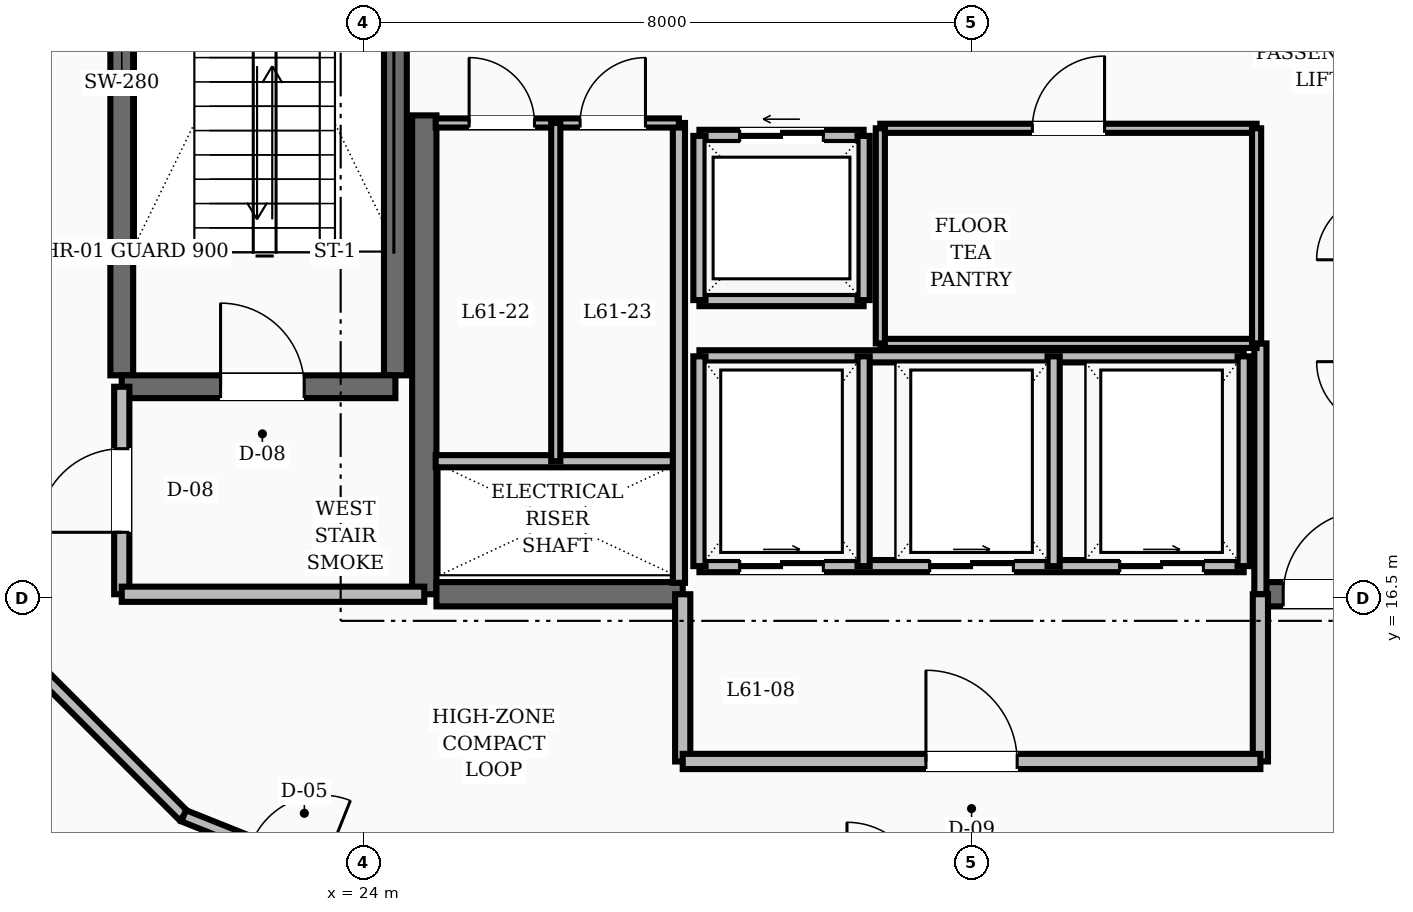
"""IFC4 building model, lengths in metres.
Left out: names, types, materials, properties, quantities, classifications, styles, units other than length and angle.
Written with IfcOpenShell. Run it as: python <this file> out.ifc"""

import sys

from ifc_helpers import new_model, si_unit, direction, frame, frame_2d, origin, place, context, subcontext, project, spatial, rectangle, extrude, element, fill, save


model = new_model("IFC4")
c1 = context("Model", 3, precision=1e-05, world=origin(), true_north=direction((0.0, 1.0)))
c2 = subcontext(c1, "Body", "Model", "MODEL_VIEW")
j1 = project(units=[si_unit("LENGTHUNIT", "METRE"), si_unit("PLANEANGLEUNIT", "RADIAN")], contexts=[c1])
p1 = place(None, origin())
s1 = spatial("IfcSite", under=j1, at=p1, CompositionType="ELEMENT")
p2 = place(p1, origin())
s2 = spatial("IfcBuilding", under=s1, at=p2, CompositionType="ELEMENT")
p3 = place(p2, frame((0.0, 0.0, 236.4)))
s3 = spatial("IfcBuildingStorey", under=s2, at=p3, CompositionType="ELEMENT", Elevation=236.4)
p4 = place(p3, frame((24.8, 16.55, 0.0), z_axis=(0.0, 0.0, 1.0), x_axis=(0.0, 1.0, 0.0)))
e1 = element("IfcWall", 1, at=p4, inside=s3, PredefinedType="SHEAR", context=c2, shape_type="SweptSolid", body=[
    extrude(rectangle(XDim=6.3, YDim=0.32, at=frame_2d((3.15, 0.0))), origin(), (0.0, 0.0, 1.0), 3.6),
])
p5 = place(p3, frame((24.96, 16.55, 0.0), z_axis=(0.0, 0.0, 1.0), x_axis=(1.0, 0.0, 0.0)))
e2 = element("IfcWall", 2, at=p5, inside=s3, PredefinedType="SHEAR", context=c2, shape_type="SweptSolid", body=[
    extrude(rectangle(XDim=3.24, YDim=0.32, at=frame_2d((1.62, 0.0))), origin(), (0.0, 0.0, 1.0), 3.6),
])
p6 = place(p3, frame((35.8, 16.55, 0.0), z_axis=(0.0, 0.0, 1.0), x_axis=(1.0, 0.0, 0.0)))
e3 = element("IfcWall", 3, at=p6, inside=s3, PredefinedType="SHEAR", context=c2, shape_type="SweptSolid", body=[
    extrude(rectangle(XDim=3.24, YDim=0.32, at=frame_2d((1.62, 0.0))), origin(), (0.0, 0.0, 1.0), 3.6),
])
p7 = place(p6, frame((0.3, 0.0, 0.0)))
e4 = element("IfcOpeningElement", 4, at=p7, cuts=e3, PredefinedType="OPENING", context=c2, shape_type="SweptSolid", body=[
    extrude(rectangle(XDim=1.1, YDim=2.1, at=frame_2d((0.55, 1.05))), frame((0.0, 0.17, 0.0), z_axis=(0.0, -1.0, 0.0), x_axis=(1.0, 0.0, 0.0)), (0.0, 0.0, 1.0), 0.34),
])
for number, where, z_axis, x_axis in (
    (5, (20.82, 19.43, 0.0), (0.0, 0.0, 1.0), (0.0, 1.0, 0.0)),
    (6, (24.42, 19.43, 0.0), (0.0, 0.0, 1.0), (0.0, 1.0, 0.0)),
):
    element("IfcWall", number, at=place(p3, frame(where, z_axis=z_axis, x_axis=x_axis)), inside=s3, PredefinedType="SHEAR", context=c2, shape_type="SweptSolid", body=[
        extrude(rectangle(XDim=8.74, YDim=0.3, at=frame_2d((4.37, 0.0))), origin(), (0.0, 0.0, 1.0), 3.6),
    ])
p8 = place(p3, frame((20.82, 19.28, 0.0), z_axis=(0.0, 0.0, 1.0), x_axis=(1.0, 0.0, 0.0)))
e7 = element("IfcWall", 7, at=p8, inside=s3, PredefinedType="SHEAR", context=c2, shape_type="SweptSolid", body=[
    extrude(rectangle(XDim=3.6, YDim=0.3, at=frame_2d((1.8, 0.0))), origin(), (0.0, 0.0, 1.0), 3.6),
])
p9 = place(p8, frame((1.3, 0.0, 0.0)))
e8 = element("IfcOpeningElement", 8, at=p9, cuts=e7, PredefinedType="OPENING", context=c2, shape_type="SweptSolid", body=[
    extrude(rectangle(XDim=1.1, YDim=2.1, at=frame_2d((0.55, 1.05))), frame((0.0, 0.16, 0.0), z_axis=(0.0, -1.0, 0.0), x_axis=(1.0, 0.0, 0.0)), (0.0, 0.0, 1.0), 0.32),
])
p10 = place(p3, frame((20.82, 16.55, 0.0), z_axis=(0.0, 0.0, 1.0), x_axis=(0.0, 1.0, 0.0)))
e9 = element("IfcWall", 9, at=p10, inside=s3, PredefinedType="SOLIDWALL", context=c2, shape_type="SweptSolid", body=[
    extrude(rectangle(XDim=2.73, YDim=0.2, at=frame_2d((1.365, 0.0))), origin(), (0.0, 0.0, 1.0), 2.87),
])
p11 = place(p10, frame((0.815, 0.0, 0.0)))
e10 = element("IfcOpeningElement", 10, at=p11, cuts=e9, PredefinedType="OPENING", context=c2, shape_type="SweptSolid", body=[
    extrude(rectangle(XDim=1.1, YDim=2.1, at=frame_2d((0.55, 1.05))), frame((0.0, 0.11, 0.0), z_axis=(0.0, -1.0, 0.0), x_axis=(1.0, 0.0, 0.0)), (0.0, 0.0, 1.0), 0.22),
])
p12 = place(p3, frame((20.82, 16.55, 0.0), z_axis=(0.0, 0.0, 1.0), x_axis=(1.0, 0.0, 0.0)))
e11 = element("IfcWall", 11, at=p12, inside=s3, PredefinedType="SOLIDWALL", context=c2, shape_type="SweptSolid", body=[
    extrude(rectangle(XDim=3.98, YDim=0.2, at=frame_2d((1.99, 0.0))), origin(), (0.0, 0.0, 1.0), 2.87),
])
p13 = place(p3, frame((35.8, 16.55, 0.0), z_axis=(0.0, 0.0, 1.0), x_axis=(0.0, 1.0, 0.0)))
e12 = element("IfcWall", 12, at=p13, inside=s3, PredefinedType="SOLIDWALL", context=c2, shape_type="SweptSolid", body=[
    extrude(rectangle(XDim=3.3, YDim=0.16, at=frame_2d((1.65, 0.0))), origin(), (0.0, 0.0, 1.0), 2.87),
])
for number, where, z_axis, x_axis in (
    (13, (28.2, 14.35, 0.0), (0.0, 0.0, 1.0), (0.0, 1.0, 0.0)),
    (14, (35.8, 14.35, 0.0), (0.0, 0.0, 1.0), (0.0, 1.0, 0.0)),
):
    element("IfcWall", number, at=place(p3, frame(where, z_axis=z_axis, x_axis=x_axis)), inside=s3, PredefinedType="SOLIDWALL", context=c2, shape_type="SweptSolid", body=[
        extrude(rectangle(XDim=2.2, YDim=0.2, at=frame_2d((1.1, 0.0))), origin(), (0.0, 0.0, 1.0), 2.87),
    ])
p14 = place(p3, frame((28.2, 14.35, 0.0), z_axis=(0.0, 0.0, 1.0), x_axis=(1.0, 0.0, 0.0)))
e15 = element("IfcWall", 15, at=p14, inside=s3, PredefinedType="SOLIDWALL", context=c2, shape_type="SweptSolid", body=[
    extrude(rectangle(XDim=7.6, YDim=0.2, at=frame_2d((3.8, 0.0))), origin(), (0.0, 0.0, 1.0), 2.87),
])
p15 = place(p14, frame((3.2, 0.0, 0.0)))
e16 = element("IfcOpeningElement", 16, at=p15, cuts=e15, PredefinedType="OPENING", context=c2, shape_type="SweptSolid", body=[
    extrude(rectangle(XDim=1.2, YDim=2.1, at=frame_2d((0.6, 1.05))), frame((0.0, 0.11, 0.0), z_axis=(0.0, -1.0, 0.0), x_axis=(1.0, 0.0, 0.0)), (0.0, 0.0, 1.0), 0.22),
])
p16 = place(p3, frame((28.42, 22.58, 0.0), z_axis=(0.0, 0.0, 1.0), x_axis=(1.0, 0.0, 0.0)))
e17 = element("IfcWall", 17, at=p16, inside=s3, PredefinedType="SOLIDWALL", context=c2, shape_type="SweptSolid", body=[
    extrude(rectangle(XDim=2.16, YDim=0.16, at=frame_2d((1.08, 0.0))), origin(), (0.0, 0.0, 1.0), 2.87),
])
p17 = place(p16, frame((0.53, 0.0, 0.0)))
e18 = element("IfcOpeningElement", 18, at=p17, cuts=e17, PredefinedType="OPENING", context=c2, shape_type="SweptSolid", body=[
    extrude(rectangle(XDim=1.1, YDim=2.15, at=frame_2d((0.55, 1.075))), frame((0.0, 0.09, 0.0), z_axis=(0.0, -1.0, 0.0), x_axis=(1.0, 0.0, 0.0)), (0.0, 0.0, 1.0), 0.18),
])
for number, where, z_axis, x_axis in (
    (19, (28.42, 20.42, 0.0), (0.0, 0.0, 1.0), (1.0, 0.0, 0.0)),
    (20, (28.42, 20.42, 0.0), (0.0, 0.0, 1.0), (0.0, 1.0, 0.0)),
    (21, (30.58, 20.42, 0.0), (0.0, 0.0, 1.0), (0.0, 1.0, 0.0)),
):
    element("IfcWall", number, at=place(p3, frame(where, z_axis=z_axis, x_axis=x_axis)), inside=s3, PredefinedType="SOLIDWALL", context=c2, shape_type="SweptSolid", body=[
        extrude(rectangle(XDim=2.16, YDim=0.16, at=frame_2d((1.08, 0.0))), origin(), (0.0, 0.0, 1.0), 2.87),
    ])
p18 = place(p3, frame((28.42, 16.92, 0.0), z_axis=(0.0, 0.0, 1.0), x_axis=(1.0, 0.0, 0.0)))
e22 = element("IfcWall", 22, at=p18, inside=s3, PredefinedType="SOLIDWALL", context=c2, shape_type="SweptSolid", body=[
    extrude(rectangle(XDim=7.16, YDim=0.16, at=frame_2d((3.58, 0.0))), origin(), (0.0, 0.0, 1.0), 2.87),
])
p19 = place(p18, frame((0.53, 0.0, 0.0)))
e23 = element("IfcOpeningElement", 23, at=p19, cuts=e22, PredefinedType="OPENING", context=c2, shape_type="SweptSolid", body=[
    extrude(rectangle(XDim=1.1, YDim=2.15, at=frame_2d((0.55, 1.075))), frame((0.0, 0.09, 0.0), z_axis=(0.0, -1.0, 0.0), x_axis=(1.0, 0.0, 0.0)), (0.0, 0.0, 1.0), 0.18),
])
p20 = place(p18, frame((3.03, 0.0, 0.0)))
e24 = element("IfcOpeningElement", 24, at=p20, cuts=e22, PredefinedType="OPENING", context=c2, shape_type="SweptSolid", body=[
    extrude(rectangle(XDim=1.1, YDim=2.15, at=frame_2d((0.55, 1.075))), frame((0.0, 0.09, 0.0), z_axis=(0.0, -1.0, 0.0), x_axis=(1.0, 0.0, 0.0)), (0.0, 0.0, 1.0), 0.18),
])
p21 = place(p18, frame((5.53, 0.0, 0.0)))
e25 = element("IfcOpeningElement", 25, at=p21, cuts=e22, PredefinedType="OPENING", context=c2, shape_type="SweptSolid", body=[
    extrude(rectangle(XDim=1.1, YDim=2.15, at=frame_2d((0.55, 1.075))), frame((0.0, 0.09, 0.0), z_axis=(0.0, -1.0, 0.0), x_axis=(1.0, 0.0, 0.0)), (0.0, 0.0, 1.0), 0.18),
])
p22 = place(p3, frame((28.42, 19.68, 0.0), z_axis=(0.0, 0.0, 1.0), x_axis=(1.0, 0.0, 0.0)))
e26 = element("IfcWall", 26, at=p22, inside=s3, PredefinedType="SOLIDWALL", context=c2, shape_type="SweptSolid", body=[
    extrude(rectangle(XDim=7.16, YDim=0.16, at=frame_2d((3.58, 0.0))), origin(), (0.0, 0.0, 1.0), 2.87),
])
for number, where, z_axis, x_axis in (
    (27, (28.42, 16.92, 0.0), (0.0, 0.0, 1.0), (0.0, 1.0, 0.0)),
    (28, (30.58, 16.92, 0.0), (0.0, 0.0, 1.0), (0.0, 1.0, 0.0)),
    (29, (33.08, 16.92, 0.0), (0.0, 0.0, 1.0), (0.0, 1.0, 0.0)),
    (30, (35.58, 16.92, 0.0), (0.0, 0.0, 1.0), (0.0, 1.0, 0.0)),
):
    element("IfcWall", number, at=place(p3, frame(where, z_axis=z_axis, x_axis=x_axis)), inside=s3, PredefinedType="SOLIDWALL", context=c2, shape_type="SweptSolid", body=[
        extrude(rectangle(XDim=2.76, YDim=0.16, at=frame_2d((1.38, 0.0))), origin(), (0.0, 0.0, 1.0), 2.87),
    ])
p23 = place(p3, frame((30.8, 22.68, 0.0), z_axis=(0.0, 0.0, 1.0), x_axis=(1.0, 0.0, 0.0)))
e31 = element("IfcWall", 31, at=p23, inside=s3, PredefinedType="PARTITIONING", context=c2, shape_type="SweptSolid", body=[
    extrude(rectangle(XDim=4.95, YDim=0.12, at=frame_2d((2.475, 0.0))), origin(), (0.0, 0.0, 1.0), 2.87),
])
p24 = place(p23, frame((2.0, 0.0, 0.0)))
e32 = element("IfcOpeningElement", 32, at=p24, cuts=e31, PredefinedType="OPENING", context=c2, shape_type="SweptSolid", body=[
    extrude(rectangle(XDim=0.95, YDim=2.1, at=frame_2d((0.475, 1.05))), frame((0.0, 0.07, 0.0), z_axis=(0.0, -1.0, 0.0), x_axis=(1.0, 0.0, 0.0)), (0.0, 0.0, 1.0), 0.14),
])
p25 = place(p3, frame((30.8, 19.85, 0.0), z_axis=(0.0, 0.0, 1.0), x_axis=(1.0, 0.0, 0.0)))
e33 = element("IfcWall", 33, at=p25, inside=s3, PredefinedType="PARTITIONING", context=c2, shape_type="SweptSolid", body=[
    extrude(rectangle(XDim=4.95, YDim=0.12, at=frame_2d((2.475, 0.0))), origin(), (0.0, 0.0, 1.0), 2.87),
])
for number, where, z_axis, x_axis in (
    (34, (30.8, 19.85, 0.0), (0.0, 0.0, 1.0), (0.0, 1.0, 0.0)),
    (35, (35.75, 19.85, 0.0), (0.0, 0.0, 1.0), (0.0, 1.0, 0.0)),
):
    element("IfcWall", number, at=place(p3, frame(where, z_axis=z_axis, x_axis=x_axis)), inside=s3, PredefinedType="PARTITIONING", context=c2, shape_type="SweptSolid", body=[
        extrude(rectangle(XDim=2.83, YDim=0.12, at=frame_2d((1.415, 0.0))), origin(), (0.0, 0.0, 1.0), 2.87),
    ])
p26 = place(p3, frame((24.95, 18.3, 0.0), z_axis=(0.0, 0.0, 1.0), x_axis=(1.0, 0.0, 0.0)))
e36 = element("IfcWall", 36, at=p26, inside=s3, PredefinedType="SOLIDWALL", context=c2, shape_type="SweptSolid", body=[
    extrude(rectangle(XDim=3.2, YDim=0.16, at=frame_2d((1.6, 0.0))), origin(), (0.0, 0.0, 1.0), 2.87),
])
p27 = place(p3, frame((28.15, 16.7, 0.0), z_axis=(0.0, 0.0, 1.0), x_axis=(0.0, 1.0, 0.0)))
e37 = element("IfcWall", 37, at=p27, inside=s3, PredefinedType="SOLIDWALL", context=c2, shape_type="SweptSolid", body=[
    extrude(rectangle(XDim=6.05, YDim=0.16, at=frame_2d((3.025, 0.0))), origin(), (0.0, 0.0, 1.0), 2.87),
])
p28 = place(p3, frame((24.95, 22.75, 0.0), z_axis=(0.0, 0.0, 1.0), x_axis=(1.0, 0.0, 0.0)))
e38 = element("IfcWall", 38, at=p28, inside=s3, PredefinedType="PARTITIONING", context=c2, shape_type="SweptSolid", body=[
    extrude(rectangle(XDim=3.2, YDim=0.12, at=frame_2d((1.6, 0.0))), origin(), (0.0, 0.0, 1.0), 2.87),
])
p29 = place(p28, frame((0.44, 0.0, 0.0)))
e39 = element("IfcOpeningElement", 39, at=p29, cuts=e38, PredefinedType="OPENING", context=c2, shape_type="SweptSolid", body=[
    extrude(rectangle(XDim=0.86, YDim=2.1, at=frame_2d((0.43, 1.05))), frame((0.0, 0.07, 0.0), z_axis=(0.0, -1.0, 0.0), x_axis=(1.0, 0.0, 0.0)), (0.0, 0.0, 1.0), 0.14),
])
p30 = place(p28, frame((1.9, 0.0, 0.0)))
e40 = element("IfcOpeningElement", 40, at=p30, cuts=e38, PredefinedType="OPENING", context=c2, shape_type="SweptSolid", body=[
    extrude(rectangle(XDim=0.86, YDim=2.1, at=frame_2d((0.43, 1.05))), frame((0.0, 0.07, 0.0), z_axis=(0.0, -1.0, 0.0), x_axis=(1.0, 0.0, 0.0)), (0.0, 0.0, 1.0), 0.14),
])
p31 = place(p3, frame((26.53, 18.3, 0.0), z_axis=(0.0, 0.0, 1.0), x_axis=(0.0, 1.0, 0.0)))
e41 = element("IfcWall", 41, at=p31, inside=s3, PredefinedType="PARTITIONING", context=c2, shape_type="SweptSolid", body=[
    extrude(rectangle(XDim=4.45, YDim=0.12, at=frame_2d((2.225, 0.0))), origin(), (0.0, 0.0, 1.0), 2.87),
])
p32 = place(p3, frame((19.573, 15.697, 0.0), z_axis=(0.0, 0.0, 1.0), x_axis=(0.707106781187, -0.707106781187, 0.0)))
e42 = element("IfcWall", 42, at=p32, inside=s3, PredefinedType="SOLIDWALL", context=c2, shape_type="SweptSolid", body=[
    extrude(rectangle(XDim=2.916, YDim=0.16, at=frame_2d((1.458, 0.0))), origin(), (0.0, 0.0, 1.0), 2.87),
])
p33 = place(p3, frame((21.635, 13.635, 0.0), z_axis=(0.0, 0.0, 1.0), x_axis=(0.92856882165, -0.371160266542, 0.0)))
e43 = element("IfcWall", 43, at=p33, inside=s3, PredefinedType="SOLIDWALL", context=c2, shape_type="SweptSolid", body=[
    extrude(rectangle(XDim=2.923, YDim=0.16, at=frame_2d((1.461, 0.0))), origin(), (0.0, 0.0, 1.0), 2.87),
])
p34 = place(p33, frame((0.962, 0.0, 0.0)))
e44 = element("IfcOpeningElement", 44, at=p34, cuts=e43, PredefinedType="OPENING", context=c2, shape_type="SweptSolid", body=[
    extrude(rectangle(XDim=1.0, YDim=2.1, at=frame_2d((0.5, 1.05))), frame((0.0, 0.09, 0.0), z_axis=(0.0, -1.0, 0.0), x_axis=(1.0, 0.0, 0.0)), (0.0, 0.0, 1.0), 0.18),
])
p35 = place(p9, origin())
e45 = element("IfcDoor", 45, at=p35, inside=s3, OperationType="SINGLE_SWING_LEFT", PredefinedType="DOOR", context=c2, shape_type="SweptSolid", body=[
    extrude(rectangle(XDim=1.1, YDim=2.1, at=frame_2d((0.55, 1.05))), frame((0.0, 0.025, 0.0), z_axis=(0.0, -1.0, 0.0), x_axis=(1.0, 0.0, 0.0)), (0.0, 0.0, 1.0), 0.05),
])
fill(e8, e45)
p36 = place(p11, origin())
e46 = element("IfcDoor", 46, at=p36, inside=s3, OperationType="SINGLE_SWING_LEFT", PredefinedType="DOOR", context=c2, shape_type="SweptSolid", body=[
    extrude(rectangle(XDim=1.1, YDim=2.1, at=frame_2d((0.55, 1.05))), frame((0.0, 0.025, 0.0), z_axis=(0.0, -1.0, 0.0), x_axis=(1.0, 0.0, 0.0)), (0.0, 0.0, 1.0), 0.05),
])
fill(e10, e46)
p37 = place(p7, origin())
e47 = element("IfcDoor", 47, at=p37, inside=s3, OperationType="SINGLE_SWING_RIGHT", PredefinedType="DOOR", context=c2, shape_type="SweptSolid", body=[
    extrude(rectangle(XDim=1.1, YDim=2.1, at=frame_2d((0.55, 1.05))), frame((0.0, 0.025, 0.0), z_axis=(0.0, -1.0, 0.0), x_axis=(1.0, 0.0, 0.0)), (0.0, 0.0, 1.0), 0.05),
])
fill(e4, e47)
p38 = place(p15, origin())
e48 = element("IfcDoor", 48, at=p38, inside=s3, OperationType="SINGLE_SWING_LEFT", PredefinedType="DOOR", context=c2, shape_type="SweptSolid", body=[
    extrude(rectangle(XDim=1.2, YDim=2.1, at=frame_2d((0.6, 1.05))), frame((0.0, 0.025, 0.0), z_axis=(0.0, -1.0, 0.0), x_axis=(1.0, 0.0, 0.0)), (0.0, 0.0, 1.0), 0.05),
])
fill(e16, e48)
p39 = place(p17, origin())
e49 = element("IfcDoor", 49, at=p39, inside=s3, OperationType="SLIDING_TO_LEFT", PredefinedType="DOOR", context=c2, shape_type="SweptSolid", body=[
    extrude(rectangle(XDim=1.1, YDim=2.15, at=frame_2d((0.55, 1.075))), frame((0.0, 0.025, 0.0), z_axis=(0.0, -1.0, 0.0), x_axis=(1.0, 0.0, 0.0)), (0.0, 0.0, 1.0), 0.05),
])
fill(e18, e49)
p40 = place(p19, origin())
e50 = element("IfcDoor", 50, at=p40, inside=s3, OperationType="SLIDING_TO_RIGHT", PredefinedType="DOOR", context=c2, shape_type="SweptSolid", body=[
    extrude(rectangle(XDim=1.1, YDim=2.15, at=frame_2d((0.55, 1.075))), frame((0.0, 0.025, 0.0), z_axis=(0.0, -1.0, 0.0), x_axis=(1.0, 0.0, 0.0)), (0.0, 0.0, 1.0), 0.05),
])
fill(e23, e50)
p41 = place(p20, origin())
e51 = element("IfcDoor", 51, at=p41, inside=s3, OperationType="SLIDING_TO_RIGHT", PredefinedType="DOOR", context=c2, shape_type="SweptSolid", body=[
    extrude(rectangle(XDim=1.1, YDim=2.15, at=frame_2d((0.55, 1.075))), frame((0.0, 0.025, 0.0), z_axis=(0.0, -1.0, 0.0), x_axis=(1.0, 0.0, 0.0)), (0.0, 0.0, 1.0), 0.05),
])
fill(e24, e51)
p42 = place(p21, origin())
e52 = element("IfcDoor", 52, at=p42, inside=s3, OperationType="SLIDING_TO_RIGHT", PredefinedType="DOOR", context=c2, shape_type="SweptSolid", body=[
    extrude(rectangle(XDim=1.1, YDim=2.15, at=frame_2d((0.55, 1.075))), frame((0.0, 0.025, 0.0), z_axis=(0.0, -1.0, 0.0), x_axis=(1.0, 0.0, 0.0)), (0.0, 0.0, 1.0), 0.05),
])
fill(e25, e52)
p43 = place(p24, origin())
e53 = element("IfcDoor", 53, at=p43, inside=s3, OperationType="SINGLE_SWING_RIGHT", PredefinedType="DOOR", context=c2, shape_type="SweptSolid", body=[
    extrude(rectangle(XDim=0.95, YDim=2.1, at=frame_2d((0.475, 1.05))), frame((0.0, 0.025, 0.0), z_axis=(0.0, -1.0, 0.0), x_axis=(1.0, 0.0, 0.0)), (0.0, 0.0, 1.0), 0.05),
])
fill(e32, e53)
p44 = place(p29, origin())
e54 = element("IfcDoor", 54, at=p44, inside=s3, OperationType="SINGLE_SWING_LEFT", PredefinedType="DOOR", context=c2, shape_type="SweptSolid", body=[
    extrude(rectangle(XDim=0.86, YDim=2.1, at=frame_2d((0.43, 1.05))), frame((0.0, 0.025, 0.0), z_axis=(0.0, -1.0, 0.0), x_axis=(1.0, 0.0, 0.0)), (0.0, 0.0, 1.0), 0.05),
])
fill(e39, e54)
p45 = place(p30, origin())
e55 = element("IfcDoor", 55, at=p45, inside=s3, OperationType="SINGLE_SWING_RIGHT", PredefinedType="DOOR", context=c2, shape_type="SweptSolid", body=[
    extrude(rectangle(XDim=0.86, YDim=2.1, at=frame_2d((0.43, 1.05))), frame((0.0, 0.025, 0.0), z_axis=(0.0, -1.0, 0.0), x_axis=(1.0, 0.0, 0.0)), (0.0, 0.0, 1.0), 0.05),
])
fill(e40, e55)
save(model, sys.argv[1])
